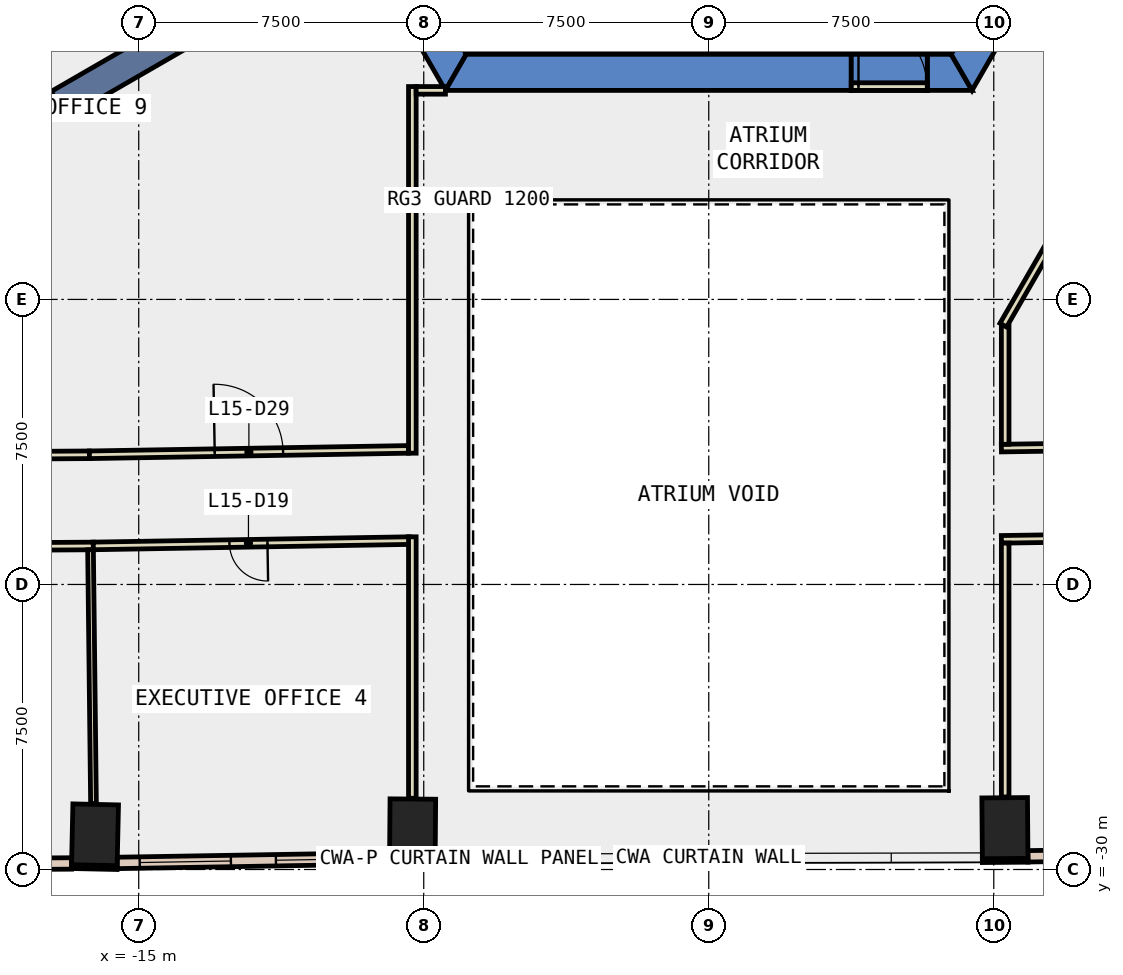
"""IFC4 building model, lengths in metres.
Left out: names, types, materials, properties, quantities, classifications, styles, units other than length and angle.
Written with IfcOpenShell. Run it as: python <this file> out.ifc"""

import sys

from ifc_helpers import new_model, si_unit, direction, frame, frame_2d, origin, origin_2d, place, context, subcontext, project, spatial, polyline, rectangle, outline, extrude, element, fill, save


model = new_model("IFC4")
c1 = context("Model", 3, precision=1e-05, world=origin(), true_north=direction((0.0, 1.0)))
c2 = subcontext(c1, "Body", "Model", "MODEL_VIEW")
j1 = project(units=[si_unit("LENGTHUNIT", "METRE"), si_unit("PLANEANGLEUNIT", "RADIAN")], contexts=[c1])
p1 = place(None, origin())
s1 = spatial("IfcSite", under=j1, at=p1, CompositionType="ELEMENT")
p2 = place(p1, origin())
s2 = spatial("IfcBuilding", under=s1, at=p2, CompositionType="ELEMENT")
p3 = place(p2, frame((0.0, 0.0, 72.8)))
s3 = spatial("IfcBuildingStorey", under=s2, at=p3, CompositionType="ELEMENT", Elevation=72.8)
for number, where, z_axis, x_axis in (
    (1, (-16.15, -29.087, -0.4), (0.0, 0.0, 1.0), (-1.0, 0.022, 0.0)),
    (2, (-7.793, -28.946, -0.4), (0.0, 0.0, 1.0), (-1.0, 0.008, 0.0)),
    (3, (7.793, -28.912, -0.4), (0.0, 0.0, 1.0), (1.0, 0.008, 0.0)),
):
    element("IfcColumn", number, at=place(p3, frame(where, z_axis=z_axis, x_axis=x_axis)), inside=s3, PredefinedType="COLUMN", context=c2, shape_type="SweptSolid", body=[
        extrude(rectangle(XDim=1.2, YDim=1.6, at=origin_2d()), origin(), (0.0, 0.0, 1.0), 4.2),
    ])
p4 = place(p3, frame((0.0, 0.0, -0.4)))
e4 = element("IfcWall", 4, at=p4, inside=s3, PredefinedType="SHEAR", context=c2, shape_type="SweptSolid", body=[
    extrude(outline(polyline([(-13.856, 2.5), (-6.928, -9.5), (-6.38, -8.55), (-12.759, 2.5), (-13.856, 2.5)])), origin(), (0.0, 0.0, 1.0), 4.2),
])
p5 = place(p3, frame((0.0, 0.0, -0.4)))
e5 = element("IfcWall", 5, at=p5, inside=s3, PredefinedType="SHEAR", context=c2, shape_type="SweptSolid", body=[
    extrude(outline(polyline([(3.75, -9.5), (3.75, -8.55), (-6.38, -8.55), (-6.928, -9.5), (3.75, -9.5)])), origin(), (0.0, 0.0, 1.0), 4.2),
])
p6 = place(p3, frame((0.0, 0.0, -0.4)))
e6 = element("IfcWall", 6, at=p6, inside=s3, PredefinedType="SHEAR", context=c2, shape_type="SweptSolid", body=[
    extrude(outline(polyline([(5.75, -8.55), (5.75, -9.5), (6.928, -9.5), (6.38, -8.55), (5.75, -8.55)])), origin(), (0.0, 0.0, 1.0), 4.2),
])
p7 = place(p3, frame((0.0, 0.0, 3.6)))
e7 = element("IfcWall", 7, at=p7, inside=s3, PredefinedType="SHEAR", context=c2, shape_type="SweptSolid", body=[
    extrude(outline(polyline([(5.75, -9.5), (5.75, -8.55), (3.75, -8.55), (3.75, -9.5), (5.75, -9.5)])), origin(), (0.0, 0.0, 1.0), 0.2),
])
p8 = place(p3, frame((0.0, 0.0, -0.4)))
e8 = element("IfcWall", 8, at=p8, inside=s3, PredefinedType="SHEAR", context=c2, shape_type="SweptSolid", body=[
    extrude(outline(polyline([(8.117, -7.44), (7.295, -6.965), (6.38, -8.55), (6.928, -9.5), (8.117, -7.44)])), origin(), (0.0, 0.0, 1.0), 4.2),
])
p9 = place(p3, frame((-9.31, -5.375, -0.4), z_axis=(0.0, 0.0, 1.0), x_axis=(-0.866017533419, -0.500013631625, 0.0)))
e9 = element("IfcWall", 9, at=p9, inside=s3, PredefinedType="SHEAR", context=c2, shape_type="SweptSolid", body=[
    extrude(rectangle(XDim=9.0, YDim=0.8, at=frame_2d((4.5, 0.0))), origin(), (0.0, 0.0, 1.0), 4.2),
])
p10 = place(p3, frame((-16.769, -29.924, 0.0), z_axis=(0.0, 0.0, 1.0), x_axis=(0.99976752127, -0.021561618973, 0.0)))
e10 = element("IfcWall", 10, at=p10, inside=s3, PredefinedType="STANDARD", context=c2, shape_type="SweptSolid", body=[
    extrude(rectangle(XDim=1.2, YDim=0.1, at=frame_2d((0.6, 0.0))), origin(), (0.0, 0.0, 1.0), 3.8),
])
for number, where, z_axis, x_axis in (
    (11, (-8.4, -29.791, 0.0), (0.0, 0.0, 1.0), (1.0, -0.008, 0.0)),
    (12, (7.2, -29.767, 0.0), (0.0, 0.0, 1.0), (1.0, 0.008, 0.0)),
):
    element("IfcWall", number, at=place(p3, frame(where, z_axis=z_axis, x_axis=x_axis)), inside=s3, PredefinedType="STANDARD", context=c2, shape_type="SweptSolid", body=[
        extrude(rectangle(XDim=1.2, YDim=0.1, at=frame_2d((0.6, 0.0))), origin(), (0.0, 0.0, 1.0), 3.8),
    ])
p11 = place(p3, frame((-23.935, -29.888, 0.0), z_axis=(0.0, 0.0, 1.0), x_axis=(0.999978623918, 0.006538478947, 0.0)))
e13 = element("IfcWall", 13, at=p11, inside=s3, PredefinedType="STANDARD", context=c2, shape_type="SweptSolid", body=[
    extrude(rectangle(XDim=7.169, YDim=0.3, at=frame_2d((3.584, 0.0))), origin(), (0.0, 0.0, 1.0), 3.8),
])
p12 = place(p11, frame((0.592, 0.0, 0.9)))
e14 = element("IfcOpeningElement", 14, at=p12, cuts=e13, PredefinedType="OPENING", context=c2, shape_type="SweptSolid", body=[
    extrude(rectangle(XDim=2.4, YDim=2.6, at=frame_2d((1.2, 1.3))), frame((0.0, 0.16, 0.0), z_axis=(0.0, -1.0, 0.0), x_axis=(1.0, 0.0, 0.0)), (0.0, 0.0, 1.0), 0.32),
])
p13 = place(p11, frame((4.177, 0.0, 0.9)))
e15 = element("IfcOpeningElement", 15, at=p13, cuts=e13, PredefinedType="OPENING", context=c2, shape_type="SweptSolid", body=[
    extrude(rectangle(XDim=2.4, YDim=2.6, at=frame_2d((1.2, 1.3))), frame((0.0, 0.16, 0.0), z_axis=(0.0, -1.0, 0.0), x_axis=(1.0, 0.0, 0.0)), (0.0, 0.0, 1.0), 0.32),
])
p14 = place(p3, frame((-15.567, -29.827, 0.0), z_axis=(0.0, 0.0, 1.0), x_axis=(0.999857944706, 0.0168549817, 0.0)))
e16 = element("IfcWall", 16, at=p14, inside=s3, PredefinedType="STANDARD", context=c2, shape_type="SweptSolid", body=[
    extrude(rectangle(XDim=7.17, YDim=0.3, at=frame_2d((3.585, 0.0))), origin(), (0.0, 0.0, 1.0), 3.8),
])
p15 = place(p14, frame((0.593, 0.0, 0.9)))
e17 = element("IfcOpeningElement", 17, at=p15, cuts=e16, PredefinedType="OPENING", context=c2, shape_type="SweptSolid", body=[
    extrude(rectangle(XDim=2.4, YDim=2.6, at=frame_2d((1.2, 1.3))), frame((0.0, 0.16, 0.0), z_axis=(0.0, -1.0, 0.0), x_axis=(1.0, 0.0, 0.0)), (0.0, 0.0, 1.0), 0.32),
])
p16 = place(p14, frame((4.178, 0.0, 0.9)))
e18 = element("IfcOpeningElement", 18, at=p16, cuts=e16, PredefinedType="OPENING", context=c2, shape_type="SweptSolid", body=[
    extrude(rectangle(XDim=2.4, YDim=2.6, at=frame_2d((1.2, 1.3))), frame((0.0, 0.16, 0.0), z_axis=(0.0, -1.0, 0.0), x_axis=(1.0, 0.0, 0.0)), (0.0, 0.0, 1.0), 0.32),
])
p17 = place(p3, frame((8.398, -29.653, 0.0), z_axis=(0.0, 0.0, 1.0), x_axis=(0.999888301342, 0.014946064363, 0.0)))
e19 = element("IfcWall", 19, at=p17, inside=s3, PredefinedType="STANDARD", context=c2, shape_type="SweptSolid", body=[
    extrude(rectangle(XDim=7.171, YDim=0.3, at=frame_2d((3.585, 0.0))), origin(), (0.0, 0.0, 1.0), 3.8),
])
p18 = place(p17, frame((0.593, 0.0, 0.9)))
e20 = element("IfcOpeningElement", 20, at=p18, cuts=e19, PredefinedType="OPENING", context=c2, shape_type="SweptSolid", body=[
    extrude(rectangle(XDim=2.4, YDim=2.6, at=frame_2d((1.2, 1.3))), frame((0.0, 0.16, 0.0), z_axis=(0.0, -1.0, 0.0), x_axis=(1.0, 0.0, 0.0)), (0.0, 0.0, 1.0), 0.32),
])
p19 = place(p17, frame((4.178, 0.0, 0.9)))
e21 = element("IfcOpeningElement", 21, at=p19, cuts=e19, PredefinedType="OPENING", context=c2, shape_type="SweptSolid", body=[
    extrude(rectangle(XDim=2.4, YDim=2.6, at=frame_2d((1.2, 1.3))), frame((0.0, 0.16, 0.0), z_axis=(0.0, -1.0, 0.0), x_axis=(1.0, 0.0, 0.0)), (0.0, 0.0, 1.0), 0.32),
])
p20 = place(p3, frame((7.7, -18.912, 0.0), z_axis=(0.0, 0.0, 1.0), x_axis=(0.999888819649, 0.014911349423, 0.0)))
e22 = element("IfcWall", 22, at=p20, inside=s3, PredefinedType="PARTITIONING", context=c2, shape_type="SweptSolid", body=[
    extrude(rectangle(XDim=8.252, YDim=0.2, at=frame_2d((4.126, 0.0))), origin(), (0.0, 0.0, 1.0), 3.8),
])
p21 = place(p20, frame((3.626, 0.0, 0.0)))
e23 = element("IfcOpeningElement", 23, at=p21, cuts=e22, PredefinedType="OPENING", context=c2, shape_type="SweptSolid", body=[
    extrude(rectangle(XDim=1.0, YDim=2.1, at=frame_2d((0.5, 1.05))), frame((0.0, 0.11, 0.0), z_axis=(0.0, -1.0, 0.0), x_axis=(1.0, 0.0, 0.0)), (0.0, 0.0, 1.0), 0.22),
])
p22 = place(p3, frame((-24.528, -19.142, 0.0), z_axis=(0.0, 0.0, 1.0), x_axis=(0.999978315754, 0.00658544011, 0.0)))
e24 = element("IfcWall", 24, at=p22, inside=s3, PredefinedType="PARTITIONING", context=c2, shape_type="SweptSolid", body=[
    extrude(rectangle(XDim=8.23, YDim=0.2, at=frame_2d((4.115, 0.0))), origin(), (0.0, 0.0, 1.0), 3.8),
])
p23 = place(p3, frame((-16.298, -19.088, 0.0), z_axis=(0.0, 0.0, 1.0), x_axis=(0.999857252997, 0.016895964865, 0.0)))
e25 = element("IfcWall", 25, at=p23, inside=s3, PredefinedType="PARTITIONING", context=c2, shape_type="SweptSolid", body=[
    extrude(rectangle(XDim=8.395, YDim=0.2, at=frame_2d((4.198, 0.0))), origin(), (0.0, 0.0, 1.0), 3.8),
])
p24 = place(p23, frame((3.298, 0.0, 0.0)))
e26 = element("IfcOpeningElement", 26, at=p24, cuts=e25, PredefinedType="OPENING", context=c2, shape_type="SweptSolid", body=[
    extrude(rectangle(XDim=1.8, YDim=2.1, at=frame_2d((0.9, 1.05))), frame((0.0, 0.11, 0.0), z_axis=(0.0, -1.0, 0.0), x_axis=(1.0, 0.0, 0.0)), (0.0, 0.0, 1.0), 0.22),
])
p25 = place(p3, frame((15.999, -21.189, 0.0), z_axis=(0.0, 0.0, 1.0), x_axis=(-0.999888353348, -0.014942584753, 0.0)))
e27 = element("IfcWall", 27, at=p25, inside=s3, PredefinedType="PARTITIONING", context=c2, shape_type="SweptSolid", body=[
    extrude(rectangle(XDim=8.3, YDim=0.2, at=frame_2d((4.15, 0.0))), origin(), (0.0, 0.0, 1.0), 3.8),
])
p26 = place(p25, frame((3.55, 0.0, 0.0)))
e28 = element("IfcOpeningElement", 28, at=p26, cuts=e27, PredefinedType="OPENING", context=c2, shape_type="SweptSolid", body=[
    extrude(rectangle(XDim=1.0, YDim=2.1, at=frame_2d((0.5, 1.05))), frame((0.0, 0.11, 0.0), z_axis=(0.0, -1.0, 0.0), x_axis=(1.0, 0.0, 0.0)), (0.0, 0.0, 1.0), 0.22),
])
p27 = place(p3, frame((-16.195, -21.487, 0.0), z_axis=(0.0, 0.0, 1.0), x_axis=(-0.999978288386, -0.006589594508, 0.0)))
e29 = element("IfcWall", 29, at=p27, inside=s3, PredefinedType="PARTITIONING", context=c2, shape_type="SweptSolid", body=[
    extrude(rectangle(XDim=8.336, YDim=0.2, at=frame_2d((4.168, 0.0))), origin(), (0.0, 0.0, 1.0), 3.8),
])
p28 = place(p27, frame((3.706, 0.0, 0.0)))
e30 = element("IfcOpeningElement", 30, at=p28, cuts=e29, PredefinedType="OPENING", context=c2, shape_type="SweptSolid", body=[
    extrude(rectangle(XDim=1.0, YDim=2.1, at=frame_2d((0.5, 1.05))), frame((0.0, 0.11, 0.0), z_axis=(0.0, -1.0, 0.0), x_axis=(1.0, 0.0, 0.0)), (0.0, 0.0, 1.0), 0.22),
])
p29 = place(p3, frame((-7.881, -21.346, 0.0), z_axis=(0.0, 0.0, 1.0), x_axis=(-0.999857974935, -0.016853188395, 0.0)))
e31 = element("IfcWall", 31, at=p29, inside=s3, PredefinedType="PARTITIONING", context=c2, shape_type="SweptSolid", body=[
    extrude(rectangle(XDim=8.315, YDim=0.2, at=frame_2d((4.158, 0.0))), origin(), (0.0, 0.0, 1.0), 3.8),
])
p30 = place(p29, frame((3.732, 0.0, 0.0)))
e32 = element("IfcOpeningElement", 32, at=p30, cuts=e31, PredefinedType="OPENING", context=c2, shape_type="SweptSolid", body=[
    extrude(rectangle(XDim=1.0, YDim=2.1, at=frame_2d((0.5, 1.05))), frame((0.0, 0.11, 0.0), z_axis=(0.0, -1.0, 0.0), x_axis=(1.0, 0.0, 0.0)), (0.0, 0.0, 1.0), 0.22),
])
p31 = place(p3, frame((7.8, -15.69, 0.0), z_axis=(0.0, 0.0, 1.0), x_axis=(0.0, -1.0, 0.0)))
e33 = element("IfcWall", 33, at=p31, inside=s3, PredefinedType="PARTITIONING", context=c2, shape_type="SweptSolid", body=[
    extrude(rectangle(XDim=3.121, YDim=0.2, at=frame_2d((1.561, 0.0))), origin(), (0.0, 0.0, 1.0), 3.8),
])
p32 = place(p3, frame((-7.8, -19.046, 0.0), z_axis=(0.0, 0.0, 1.0), x_axis=(0.0, 1.0, 0.0)))
e34 = element("IfcWall", 34, at=p32, inside=s3, PredefinedType="PARTITIONING", context=c2, shape_type="SweptSolid", body=[
    extrude(rectangle(XDim=9.647, YDim=0.2, at=frame_2d((4.823, 0.0))), origin(), (0.0, 0.0, 1.0), 3.8),
])
p33 = place(p3, frame((-7.7, -9.499, 0.0), z_axis=(0.0, 0.0, 1.0), x_axis=(1.0, 0.0, 0.0)))
e35 = element("IfcWall", 35, at=p33, inside=s3, PredefinedType="PARTITIONING", context=c2, shape_type="SweptSolid", body=[
    extrude(rectangle(XDim=0.771, YDim=0.2, at=frame_2d((0.385, 0.0))), origin(), (0.0, 0.0, 1.0), 3.8),
])
p34 = place(p3, frame((7.8, -21.411, 0.0), z_axis=(0.0, 0.0, 1.0), x_axis=(0.0, -1.0, 0.0)))
e36 = element("IfcWall", 36, at=p34, inside=s3, PredefinedType="PARTITIONING", context=c2, shape_type="SweptSolid", body=[
    extrude(rectangle(XDim=6.681, YDim=0.2, at=frame_2d((3.341, 0.0))), origin(), (0.0, 0.0, 1.0), 3.8),
])
p35 = place(p3, frame((-7.8, -28.126, 0.0), z_axis=(0.0, 0.0, 1.0), x_axis=(0.0, 1.0, 0.0)))
e37 = element("IfcWall", 37, at=p35, inside=s3, PredefinedType="PARTITIONING", context=c2, shape_type="SweptSolid", body=[
    extrude(rectangle(XDim=6.88, YDim=0.2, at=frame_2d((3.44, 0.0))), origin(), (0.0, 0.0, 1.0), 3.8),
])
p36 = place(p3, frame((12.4, -7.621, 0.0), z_axis=(0.0, 0.0, 1.0), x_axis=(-0.49990497871, -0.866080257402, 0.0)))
e38 = element("IfcWall", 38, at=p36, inside=s3, PredefinedType="PARTITIONING", context=c2, shape_type="SweptSolid", body=[
    extrude(rectangle(XDim=9.302, YDim=0.2, at=frame_2d((4.651, 0.0))), origin(), (0.0, 0.0, 1.0), 3.8),
])
p37 = place(p3, frame((-16.268, -21.587, 0.0), z_axis=(0.0, 0.0, 1.0), x_axis=(0.0116959614, -0.999931599904, 0.0)))
e39 = element("IfcWall", 39, at=p37, inside=s3, PredefinedType="PARTITIONING", context=c2, shape_type="SweptSolid", body=[
    extrude(rectangle(XDim=6.68, YDim=0.15, at=frame_2d((3.34, 0.0))), origin(), (0.0, 0.0, 1.0), 3.8),
])
p38 = place(p3, frame((3.75, -9.4, 0.0), z_axis=(0.0, 0.0, 1.0), x_axis=(1.0, 0.0, 0.0)))
e40 = element("IfcWall", 40, at=p38, inside=s3, PredefinedType="PARTITIONING", context=c2, shape_type="SweptSolid", body=[
    extrude(rectangle(XDim=2.0, YDim=0.2, at=frame_2d((1.0, 0.0))), origin(), (0.0, 0.0, 1.0), 2.4),
])
p39 = place(p38, frame((0.19, 0.0, 0.0)))
e41 = element("IfcOpeningElement", 41, at=p39, cuts=e40, PredefinedType="OPENING", context=c2, shape_type="SweptSolid", body=[
    extrude(rectangle(XDim=1.8, YDim=2.1, at=frame_2d((0.9, 1.05))), frame((0.0, 0.11, 0.0), z_axis=(0.0, -1.0, 0.0), x_axis=(1.0, 0.0, 0.0)), (0.0, 0.0, 1.0), 0.22),
])
p40 = place(p15, origin())
e42 = element("IfcWindow", 42, at=p40, inside=s3, PartitioningType="SINGLE_PANEL", PredefinedType="WINDOW", context=c2, shape_type="SweptSolid", body=[
    extrude(rectangle(XDim=2.4, YDim=2.6, at=frame_2d((1.2, 1.3))), frame((0.0, 0.03, 0.0), z_axis=(0.0, -1.0, 0.0), x_axis=(1.0, 0.0, 0.0)), (0.0, 0.0, 1.0), 0.06),
])
fill(e17, e42)
p41 = place(p16, origin())
e43 = element("IfcWindow", 43, at=p41, inside=s3, PartitioningType="SINGLE_PANEL", PredefinedType="WINDOW", context=c2, shape_type="SweptSolid", body=[
    extrude(rectangle(XDim=2.4, YDim=2.6, at=frame_2d((1.2, 1.3))), frame((0.0, 0.03, 0.0), z_axis=(0.0, -1.0, 0.0), x_axis=(1.0, 0.0, 0.0)), (0.0, 0.0, 1.0), 0.06),
])
fill(e18, e43)
p42 = place(p30, origin())
e44 = element("IfcDoor", 44, at=p42, inside=s3, OperationType="SINGLE_SWING_RIGHT", PredefinedType="DOOR", context=c2, shape_type="SweptSolid", body=[
    extrude(rectangle(XDim=1.0, YDim=2.1, at=frame_2d((0.5, 1.05))), frame((0.0, 0.025, 0.0), z_axis=(0.0, -1.0, 0.0), x_axis=(1.0, 0.0, 0.0)), (0.0, 0.0, 1.0), 0.05),
])
fill(e32, e44)
p43 = place(p24, origin())
e45 = element("IfcDoor", 45, at=p43, inside=s3, OperationType="DOUBLE_DOOR_SINGLE_SWING", PredefinedType="DOOR", context=c2, shape_type="SweptSolid", body=[
    extrude(rectangle(XDim=1.8, YDim=2.1, at=frame_2d((0.9, 1.05))), frame((0.0, 0.025, 0.0), z_axis=(0.0, -1.0, 0.0), x_axis=(1.0, 0.0, 0.0)), (0.0, 0.0, 1.0), 0.05),
])
fill(e26, e45)
p44 = place(p39, origin())
e46 = element("IfcDoor", 46, at=p44, inside=s3, OperationType="DOUBLE_DOOR_SINGLE_SWING", PredefinedType="DOOR", context=c2, shape_type="SweptSolid", body=[
    extrude(rectangle(XDim=1.8, YDim=2.1, at=frame_2d((0.9, 1.05))), frame((0.0, 0.025, 0.0), z_axis=(0.0, -1.0, 0.0), x_axis=(1.0, 0.0, 0.0)), (0.0, 0.0, 1.0), 0.05),
])
fill(e41, e46)
save(model, sys.argv[1])
